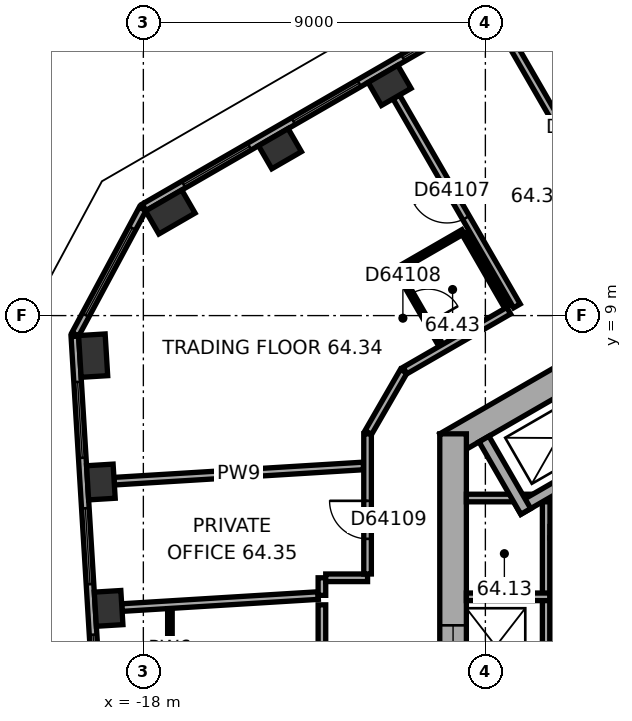
"""IFC4 building model, lengths in metres.
Left out: names, types, materials, properties, quantities, classifications, styles, units other than length and angle.
Written with IfcOpenShell. Run it as: python <this file> out.ifc"""

import sys

from ifc_helpers import new_model, si_unit, direction, frame, frame_2d, origin, origin_2d, place, context, subcontext, project, spatial, rectangle, extrude, element, fill, save


model = new_model("IFC4")
c1 = context("Model", 3, precision=1e-05, world=origin(), true_north=direction((0.0, 1.0)))
c2 = subcontext(c1, "Body", "Model", "MODEL_VIEW")
j1 = project(units=[si_unit("LENGTHUNIT", "METRE"), si_unit("PLANEANGLEUNIT", "RADIAN")], contexts=[c1])
p1 = place(None, origin())
s1 = spatial("IfcSite", under=j1, at=p1, CompositionType="ELEMENT")
p2 = place(p1, origin())
s2 = spatial("IfcBuilding", under=s1, at=p2, CompositionType="ELEMENT")
p3 = place(p2, frame((0.0, 0.0, 259.8)))
s3 = spatial("IfcBuildingStorey", under=s2, at=p3, CompositionType="ELEMENT", Elevation=259.8)
for number, where, z_axis, x_axis in (
    (1, (-11.52, 15.057, 0.0), (0.0, 0.0, 1.0), (-0.866, -0.5, 0.0)),
    (2, (-14.406, 13.391, 0.0), (0.0, 0.0, 1.0), (-0.866, -0.5, 0.0)),
):
    element("IfcColumn", number, at=place(p3, frame(where, z_axis=z_axis, x_axis=x_axis)), inside=s3, PredefinedType="COLUMN", context=c2, shape_type="SweptSolid", body=[
        extrude(rectangle(XDim=0.9, YDim=0.7, at=origin_2d()), origin(), (0.0, 0.0, 1.0), 3.7),
    ])
for number, where, z_axis, x_axis in (
    (3, (-17.291, 11.726, 0.0), (0.0, 0.0, 1.0), (-0.866, -0.5, 0.0)),
    (4, (-19.321, 7.947, 0.0), (0.0, 0.0, 1.0), (0.061, -0.998, 0.0)),
):
    element("IfcColumn", number, at=place(p3, frame(where, z_axis=z_axis, x_axis=x_axis)), inside=s3, PredefinedType="COLUMN", context=c2, shape_type="SweptSolid", body=[
        extrude(rectangle(XDim=1.1, YDim=0.7, at=origin_2d()), origin(), (0.0, 0.0, 1.0), 3.7),
    ])
for number, where, z_axis, x_axis in (
    (5, (-19.118, 4.621, 0.0), (0.0, 0.0, 1.0), (0.061, -0.998, 0.0)),
    (6, (-18.914, 1.296, 0.0), (0.0, 0.0, 1.0), (0.061, -0.998, 0.0)),
):
    element("IfcColumn", number, at=place(p3, frame(where, z_axis=z_axis, x_axis=x_axis)), inside=s3, PredefinedType="COLUMN", context=c2, shape_type="SweptSolid", body=[
        extrude(rectangle(XDim=0.9, YDim=0.7, at=origin_2d()), origin(), (0.0, 0.0, 1.0), 3.7),
    ])
p4 = place(p3, frame((0.175, 11.475, 0.0), z_axis=(0.0, 0.0, 1.0), x_axis=(-0.866026453023, -0.499998182661, 0.0)))
e7 = element("IfcWall", 7, at=p4, inside=s3, PredefinedType="SHEAR", context=c2, shape_type="SweptSolid", body=[
    extrude(rectangle(XDim=11.778, YDim=0.7, at=frame_2d((5.889, 0.0))), origin(), (0.0, 0.0, 1.0), 3.7),
])
p5 = place(p4, frame((6.089, 0.0, 0.0)))
e8 = element("IfcOpeningElement", 8, at=p5, cuts=e7, PredefinedType="OPENING", context=c2, shape_type="SweptSolid", body=[
    extrude(rectangle(XDim=1.5, YDim=2.1, at=frame_2d((0.75, 1.05))), frame((0.0, 0.36, 0.0), z_axis=(0.0, -1.0, 0.0), x_axis=(1.0, 0.0, 0.0)), (0.0, 0.0, 1.0), 0.72),
])
p6 = place(p4, frame((2.939, 0.0, 0.0)))
e9 = element("IfcOpeningElement", 9, at=p6, cuts=e7, PredefinedType="OPENING", context=c2, shape_type="SweptSolid", body=[
    extrude(rectangle(XDim=0.9, YDim=2.1, at=frame_2d((0.45, 1.05))), frame((0.0, 0.36, 0.0), z_axis=(0.0, -1.0, 0.0), x_axis=(1.0, 0.0, 0.0)), (0.0, 0.0, 1.0), 0.72),
])
p7 = place(p3, frame((-9.85, 5.889, 0.0), z_axis=(0.0, 0.0, 1.0), x_axis=(0.0, -1.0, 0.0)))
e10 = element("IfcWall", 10, at=p7, inside=s3, PredefinedType="SHEAR", context=c2, shape_type="SweptSolid", body=[
    extrude(rectangle(XDim=11.778, YDim=0.7, at=frame_2d((5.889, 0.0))), origin(), (0.0, 0.0, 1.0), 3.7),
])
p8 = place(p7, frame((5.039, 0.0, 0.0)))
e11 = element("IfcOpeningElement", 11, at=p8, cuts=e10, PredefinedType="OPENING", context=c2, shape_type="SweptSolid", body=[
    extrude(rectangle(XDim=1.1, YDim=2.1, at=frame_2d((0.55, 1.05))), frame((0.0, 0.36, 0.0), z_axis=(0.0, -1.0, 0.0), x_axis=(1.0, 0.0, 0.0)), (0.0, 0.0, 1.0), 0.72),
])
p9 = place(p7, frame((7.639, 0.0, 0.0)))
e12 = element("IfcOpeningElement", 12, at=p9, cuts=e10, PredefinedType="OPENING", context=c2, shape_type="SweptSolid", body=[
    extrude(rectangle(XDim=1.1, YDim=2.1, at=frame_2d((0.55, 1.05))), frame((0.0, 0.36, 0.0), z_axis=(0.0, -1.0, 0.0), x_axis=(1.0, 0.0, 0.0)), (0.0, 0.0, 1.0), 0.72),
])
p10 = place(p3, frame((-2.624, 20.713, 0.0), z_axis=(0.0, 0.0, 1.0), x_axis=(-0.866026460444, -0.499998169808, 0.0)))
e13 = element("IfcWall", 13, at=p10, inside=s3, PredefinedType="STANDARD", context=c2, shape_type="SweptSolid", body=[
    extrude(rectangle(XDim=17.731, YDim=0.2, at=frame_2d((8.866, 0.0))), origin(), (0.0, 0.0, 1.0), 3.7),
])
p11 = place(p10, frame((1.203, 0.0, 0.9)))
e14 = element("IfcOpeningElement", 14, at=p11, cuts=e13, PredefinedType="OPENING", context=c2, shape_type="SweptSolid", body=[
    extrude(rectangle(XDim=2.0, YDim=2.0, at=frame_2d((1.0, 1.0))), frame((0.0, 0.11, 0.0), z_axis=(0.0, -1.0, 0.0), x_axis=(1.0, 0.0, 0.0)), (0.0, 0.0, 1.0), 0.22),
])
p12 = place(p10, frame((4.535, 0.0, 0.9)))
e15 = element("IfcOpeningElement", 15, at=p12, cuts=e13, PredefinedType="OPENING", context=c2, shape_type="SweptSolid", body=[
    extrude(rectangle(XDim=2.0, YDim=2.0, at=frame_2d((1.0, 1.0))), frame((0.0, 0.11, 0.0), z_axis=(0.0, -1.0, 0.0), x_axis=(1.0, 0.0, 0.0)), (0.0, 0.0, 1.0), 0.22),
])
p13 = place(p10, frame((7.867, 0.0, 0.9)))
e16 = element("IfcOpeningElement", 16, at=p13, cuts=e13, PredefinedType="OPENING", context=c2, shape_type="SweptSolid", body=[
    extrude(rectangle(XDim=2.0, YDim=2.0, at=frame_2d((1.0, 1.0))), frame((0.0, 0.11, 0.0), z_axis=(0.0, -1.0, 0.0), x_axis=(1.0, 0.0, 0.0)), (0.0, 0.0, 1.0), 0.22),
])
p14 = place(p10, frame((11.198, 0.0, 0.9)))
e17 = element("IfcOpeningElement", 17, at=p14, cuts=e13, PredefinedType="OPENING", context=c2, shape_type="SweptSolid", body=[
    extrude(rectangle(XDim=2.0, YDim=2.0, at=frame_2d((1.0, 1.0))), frame((0.0, 0.11, 0.0), z_axis=(0.0, -1.0, 0.0), x_axis=(1.0, 0.0, 0.0)), (0.0, 0.0, 1.0), 0.22),
])
p15 = place(p10, frame((14.53, 0.0, 0.9)))
e18 = element("IfcOpeningElement", 18, at=p15, cuts=e13, PredefinedType="OPENING", context=c2, shape_type="SweptSolid", body=[
    extrude(rectangle(XDim=2.0, YDim=2.0, at=frame_2d((1.0, 1.0))), frame((0.0, 0.11, 0.0), z_axis=(0.0, -1.0, 0.0), x_axis=(1.0, 0.0, 0.0)), (0.0, 0.0, 1.0), 0.22),
])
p16 = place(p3, frame((-18.018, 11.808, 0.0), z_axis=(0.0, 0.0, 1.0), x_axis=(-0.473318619185, -0.880891301315, 0.0)))
e19 = element("IfcWall", 19, at=p16, inside=s3, PredefinedType="STANDARD", context=c2, shape_type="SweptSolid", body=[
    extrude(rectangle(XDim=3.747, YDim=0.2, at=frame_2d((1.874, 0.0))), origin(), (0.0, 0.0, 1.0), 3.7),
])
p17 = place(p16, frame((0.573, 0.0, 0.9)))
e20 = element("IfcOpeningElement", 20, at=p17, cuts=e19, PredefinedType="OPENING", context=c2, shape_type="SweptSolid", body=[
    extrude(rectangle(XDim=2.6, YDim=2.0, at=frame_2d((1.3, 1.0))), frame((0.0, 0.11, 0.0), z_axis=(0.0, -1.0, 0.0), x_axis=(1.0, 0.0, 0.0)), (0.0, 0.0, 1.0), 0.22),
])
p18 = place(p3, frame((-19.803, 8.454, 0.0), z_axis=(0.0, 0.0, 1.0), x_axis=(0.061036717565, -0.998135521414, 0.0)))
e21 = element("IfcWall", 21, at=p18, inside=s3, PredefinedType="STANDARD", context=c2, shape_type="SweptSolid", body=[
    extrude(rectangle(XDim=17.731, YDim=0.2, at=frame_2d((8.866, 0.0))), origin(), (0.0, 0.0, 1.0), 3.7),
])
p19 = place(p18, frame((1.202, 0.0, 0.9)))
e22 = element("IfcOpeningElement", 22, at=p19, cuts=e21, PredefinedType="OPENING", context=c2, shape_type="SweptSolid", body=[
    extrude(rectangle(XDim=2.0, YDim=2.0, at=frame_2d((1.0, 1.0))), frame((0.0, 0.11, 0.0), z_axis=(0.0, -1.0, 0.0), x_axis=(1.0, 0.0, 0.0)), (0.0, 0.0, 1.0), 0.22),
])
p20 = place(p18, frame((4.533, 0.0, 0.9)))
e23 = element("IfcOpeningElement", 23, at=p20, cuts=e21, PredefinedType="OPENING", context=c2, shape_type="SweptSolid", body=[
    extrude(rectangle(XDim=2.0, YDim=2.0, at=frame_2d((1.0, 1.0))), frame((0.0, 0.11, 0.0), z_axis=(0.0, -1.0, 0.0), x_axis=(1.0, 0.0, 0.0)), (0.0, 0.0, 1.0), 0.22),
])
p21 = place(p18, frame((7.865, 0.0, 0.9)))
e24 = element("IfcOpeningElement", 24, at=p21, cuts=e21, PredefinedType="OPENING", context=c2, shape_type="SweptSolid", body=[
    extrude(rectangle(XDim=2.0, YDim=2.0, at=frame_2d((1.0, 1.0))), frame((0.0, 0.11, 0.0), z_axis=(0.0, -1.0, 0.0), x_axis=(1.0, 0.0, 0.0)), (0.0, 0.0, 1.0), 0.22),
])
p22 = place(p18, frame((11.197, 0.0, 0.9)))
e25 = element("IfcOpeningElement", 25, at=p22, cuts=e21, PredefinedType="OPENING", context=c2, shape_type="SweptSolid", body=[
    extrude(rectangle(XDim=2.0, YDim=2.0, at=frame_2d((1.0, 1.0))), frame((0.0, 0.11, 0.0), z_axis=(0.0, -1.0, 0.0), x_axis=(1.0, 0.0, 0.0)), (0.0, 0.0, 1.0), 0.22),
])
p23 = place(p18, frame((14.528, 0.0, 0.9)))
e26 = element("IfcOpeningElement", 26, at=p23, cuts=e21, PredefinedType="OPENING", context=c2, shape_type="SweptSolid", body=[
    extrude(rectangle(XDim=2.0, YDim=2.0, at=frame_2d((1.0, 1.0))), frame((0.0, 0.11, 0.0), z_axis=(0.0, -1.0, 0.0), x_axis=(1.0, 0.0, 0.0)), (0.0, 0.0, 1.0), 0.22),
])
p24 = place(p3, frame((-7.4, 4.3, 0.0), z_axis=(0.0, 0.0, 1.0), x_axis=(0.0, -1.0, 0.0)))
e27 = element("IfcWall", 27, at=p24, inside=s3, PredefinedType="PARTITIONING", context=c2, shape_type="SweptSolid", body=[
    extrude(rectangle(XDim=8.0, YDim=0.2, at=frame_2d((4.0, 0.0))), origin(), (0.0, 0.0, 1.0), 3.42),
])
for number, where, z_axis, x_axis in (
    (28, (-7.3, 4.2, 0.0), (0.0, 0.0, 1.0), (-1.0, 0.0, 0.0)),
    (29, (-7.3, 1.6, 0.0), (0.0, 0.0, 1.0), (-1.0, 0.0, 0.0)),
):
    element("IfcWall", number, at=place(p3, frame(where, z_axis=z_axis, x_axis=x_axis)), inside=s3, PredefinedType="PARTITIONING", context=c2, shape_type="SweptSolid", body=[
        extrude(rectangle(XDim=2.2, YDim=0.2, at=frame_2d((1.1, 0.0))), origin(), (0.0, 0.0, 1.0), 3.42),
    ])
p25 = place(p3, frame((-2.6, 3.3, 0.0), z_axis=(0.0, 0.0, 1.0), x_axis=(-1.0, 0.0, 0.0)))
e30 = element("IfcWall", 30, at=p25, inside=s3, PredefinedType="SHEAR", context=c2, shape_type="SweptSolid", body=[
    extrude(rectangle(XDim=4.7, YDim=0.3, at=frame_2d((2.35, 0.0))), origin(), (0.0, 0.0, 1.0), 3.42),
])
p26 = place(p25, frame((0.8, 0.0, 0.0)))
e31 = element("IfcOpeningElement", 31, at=p26, cuts=e30, PredefinedType="OPENING", context=c2, shape_type="SweptSolid", body=[
    extrude(rectangle(XDim=1.2, YDim=2.1, at=frame_2d((0.6, 1.05))), frame((0.0, 0.16, 0.0), z_axis=(0.0, -1.0, 0.0), x_axis=(1.0, 0.0, 0.0)), (0.0, 0.0, 1.0), 0.32),
])
p27 = place(p3, frame((-7.15, 3.15, 0.0), z_axis=(0.0, 0.0, 1.0), x_axis=(0.0, -1.0, 0.0)))
e32 = element("IfcWall", 32, at=p27, inside=s3, PredefinedType="SHEAR", context=c2, shape_type="SweptSolid", body=[
    extrude(rectangle(XDim=7.06, YDim=0.3, at=frame_2d((3.53, 0.0))), origin(), (0.0, 0.0, 1.0), 3.42),
])
p28 = place(p3, frame((-5.24, 5.577, 0.0), z_axis=(0.0, 0.0, 1.0), x_axis=(-0.866014461049, -0.500018952895, 0.0)))
e33 = element("IfcWall", 33, at=p28, inside=s3, PredefinedType="SHEAR", context=c2, shape_type="SweptSolid", body=[
    extrude(rectangle(XDim=3.35, YDim=0.3, at=frame_2d((1.675, 0.0))), origin(), (0.0, 0.0, 1.0), 3.42),
])
p29 = place(p3, frame((-7.937, 3.847, 0.0), z_axis=(0.0, 0.0, 1.0), x_axis=(-0.50002983664, 0.866008176907, 0.0)))
e34 = element("IfcWall", 34, at=p29, inside=s3, PredefinedType="SHEAR", context=c2, shape_type="SweptSolid", body=[
    extrude(rectangle(XDim=2.2, YDim=0.3, at=frame_2d((1.1, 0.0))), origin(), (0.0, 0.0, 1.0), 3.42),
])
p30 = place(p3, frame((-18.768, 4.643, 0.0), z_axis=(0.0, 0.0, 1.0), x_axis=(0.99813496285, 0.0610458511, 0.0)))
e35 = element("IfcWall", 35, at=p30, inside=s3, PredefinedType="PARTITIONING", context=c2, shape_type="SweptSolid", body=[
    extrude(rectangle(XDim=6.571, YDim=0.2, at=frame_2d((3.285, 0.0))), origin(), (0.0, 0.0, 1.0), 3.42),
])
p31 = place(p3, frame((-18.565, 1.317, 0.0), z_axis=(0.0, 0.0, 1.0), x_axis=(0.998136844425, 0.061015078472, 0.0)))
e36 = element("IfcWall", 36, at=p31, inside=s3, PredefinedType="PARTITIONING", context=c2, shape_type="SweptSolid", body=[
    extrude(rectangle(XDim=5.174, YDim=0.2, at=frame_2d((2.587, 0.0))), origin(), (0.0, 0.0, 1.0), 2.87),
])
p32 = place(p3, frame((-17.301, -3.011, 0.0), z_axis=(0.0, 0.0, 1.0), x_axis=(0.0, 1.0, 0.0)))
e37 = element("IfcWall", 37, at=p32, inside=s3, PredefinedType="PARTITIONING", context=c2, shape_type="SweptSolid", body=[
    extrude(rectangle(XDim=4.3, YDim=0.12, at=frame_2d((2.15, 0.0))), origin(), (0.0, 0.0, 1.0), 3.42),
])
p33 = place(p32, frame((1.7, 0.0, 0.0)))
e38 = element("IfcOpeningElement", 38, at=p33, cuts=e37, PredefinedType="OPENING", context=c2, shape_type="SweptSolid", body=[
    extrude(rectangle(XDim=0.9, YDim=2.1, at=frame_2d((0.45, 1.05))), frame((0.0, 0.07, 0.0), z_axis=(0.0, -1.0, 0.0), x_axis=(1.0, 0.0, 0.0)), (0.0, 0.0, 1.0), 0.14),
])
p34 = place(p3, frame((-13.301, 1.389, 0.0), z_axis=(0.0, 0.0, 1.0), x_axis=(0.0, -1.0, 0.0)))
e39 = element("IfcWall", 39, at=p34, inside=s3, PredefinedType="PARTITIONING", context=c2, shape_type="SweptSolid", body=[
    extrude(rectangle(XDim=5.39, YDim=0.2, at=frame_2d((2.695, 0.0))), origin(), (0.0, 0.0, 1.0), 3.42),
])
p35 = place(p3, frame((-13.301, 2.101, 0.0), z_axis=(0.0, 0.0, 1.0), x_axis=(0.0, -1.0, 0.0)))
e40 = element("IfcWall", 40, at=p35, inside=s3, PredefinedType="PARTITIONING", context=c2, shape_type="SweptSolid", body=[
    extrude(rectangle(XDim=0.462, YDim=0.2, at=frame_2d((0.231, 0.0))), origin(), (0.0, 0.0, 1.0), 3.42),
])
p36 = place(p3, frame((-12.1, 2.101, 0.0), z_axis=(0.0, 0.0, 1.0), x_axis=(-1.0, 0.0, 0.0)))
e41 = element("IfcWall", 41, at=p36, inside=s3, PredefinedType="PARTITIONING", context=c2, shape_type="SweptSolid", body=[
    extrude(rectangle(XDim=1.101, YDim=0.2, at=frame_2d((0.55, 0.0))), origin(), (0.0, 0.0, 1.0), 3.42),
])
p37 = place(p3, frame((-12.1, 5.889, 0.0), z_axis=(0.0, 0.0, 1.0), x_axis=(0.0, -1.0, 0.0)))
e42 = element("IfcWall", 42, at=p37, inside=s3, PredefinedType="PARTITIONING", context=c2, shape_type="SweptSolid", body=[
    extrude(rectangle(XDim=3.688, YDim=0.2, at=frame_2d((1.844, 0.0))), origin(), (0.0, 0.0, 1.0), 3.42),
])
p38 = place(p37, frame((1.763, 0.0, 0.0)))
e43 = element("IfcOpeningElement", 43, at=p38, cuts=e42, PredefinedType="OPENING", context=c2, shape_type="SweptSolid", body=[
    extrude(rectangle(XDim=1.0, YDim=2.1, at=frame_2d((0.5, 1.05))), frame((0.0, 0.11, 0.0), z_axis=(0.0, -1.0, 0.0), x_axis=(1.0, 0.0, 0.0)), (0.0, 0.0, 1.0), 0.22),
])
p39 = place(p3, frame((-11.345, 14.754, 0.0), z_axis=(0.0, 0.0, 1.0), x_axis=(0.500005339912, -0.866022320763, 0.0)))
e44 = element("IfcWall", 44, at=p39, inside=s3, PredefinedType="PARTITIONING", context=c2, shape_type="SweptSolid", body=[
    extrude(rectangle(XDim=6.35, YDim=0.2, at=frame_2d((3.175, 0.0))), origin(), (0.0, 0.0, 1.0), 3.42),
])
p40 = place(p39, frame((2.675, 0.0, 0.0)))
e45 = element("IfcOpeningElement", 45, at=p40, cuts=e44, PredefinedType="OPENING", context=c2, shape_type="SweptSolid", body=[
    extrude(rectangle(XDim=1.0, YDim=2.1, at=frame_2d((0.5, 1.05))), frame((0.0, 0.11, 0.0), z_axis=(0.0, -1.0, 0.0), x_axis=(1.0, 0.0, 0.0)), (0.0, 0.0, 1.0), 0.22),
])
p41 = place(p3, frame((-11.319, 10.208, 0.0), z_axis=(0.0, 0.0, 1.0), x_axis=(0.866010750942, 0.50002537861, 0.0)))
e46 = element("IfcWall", 46, at=p41, inside=s3, PredefinedType="PARTITIONING", context=c2, shape_type="SweptSolid", body=[
    extrude(rectangle(XDim=2.0, YDim=0.12, at=frame_2d((1.0, 0.0))), origin(), (0.0, 0.0, 1.0), 3.42),
])
p42 = place(p3, frame((-11.15, 7.534, 0.0), z_axis=(0.0, 0.0, 1.0), x_axis=(-0.500063286585, -0.865988862174, 0.0)))
e47 = element("IfcWall", 47, at=p42, inside=s3, PredefinedType="PARTITIONING", context=c2, shape_type="SweptSolid", body=[
    extrude(rectangle(XDim=1.86, YDim=0.2, at=frame_2d((0.93, 0.0))), origin(), (0.0, 0.0, 1.0), 3.42),
])
p43 = place(p3, frame((-10.169, 8.216, 0.0), z_axis=(0.0, 0.0, 1.0), x_axis=(-0.500030632641, 0.866007717299, 0.0)))
e48 = element("IfcWall", 48, at=p43, inside=s3, PredefinedType="PARTITIONING", context=c2, shape_type="SweptSolid", body=[
    extrude(rectangle(XDim=2.24, YDim=0.12, at=frame_2d((1.12, 0.0))), origin(), (0.0, 0.0, 1.0), 3.42),
])
p44 = place(p43, frame((0.67, 0.0, 0.0)))
e49 = element("IfcOpeningElement", 49, at=p44, cuts=e48, PredefinedType="OPENING", context=c2, shape_type="SweptSolid", body=[
    extrude(rectangle(XDim=0.9, YDim=2.1, at=frame_2d((0.45, 1.05))), frame((0.0, 0.07, 0.0), z_axis=(0.0, -1.0, 0.0), x_axis=(1.0, 0.0, 0.0)), (0.0, 0.0, 1.0), 0.14),
])
p45 = place(p3, frame((-9.557, 11.156, 0.0), z_axis=(0.0, 0.0, 1.0), x_axis=(0.49994888933, -0.866054910533, 0.0)))
e50 = element("IfcWall", 50, at=p45, inside=s3, PredefinedType="PARTITIONING", context=c2, shape_type="SweptSolid", body=[
    extrude(rectangle(XDim=2.24, YDim=0.12, at=frame_2d((1.12, 0.0))), origin(), (0.0, 0.0, 1.0), 3.42),
])
p46 = place(p3, frame((-8.46, 16.42, 0.0), z_axis=(0.0, 0.0, 1.0), x_axis=(0.500005339912, -0.866022320763, 0.0)))
e51 = element("IfcWall", 51, at=p46, inside=s3, PredefinedType="PARTITIONING", context=c2, shape_type="SweptSolid", body=[
    extrude(rectangle(XDim=6.35, YDim=0.2, at=frame_2d((3.175, 0.0))), origin(), (0.0, 0.0, 1.0), 2.87),
])
p47 = place(p46, frame((2.675, 0.0, 0.0)))
e52 = element("IfcOpeningElement", 52, at=p47, cuts=e51, PredefinedType="OPENING", context=c2, shape_type="SweptSolid", body=[
    extrude(rectangle(XDim=1.0, YDim=2.1, at=frame_2d((0.5, 1.05))), frame((0.0, 0.11, 0.0), z_axis=(0.0, -1.0, 0.0), x_axis=(1.0, 0.0, 0.0)), (0.0, 0.0, 1.0), 0.22),
])
p48 = place(p3, frame((-8.387, 9.13, 0.0), z_axis=(0.0, 0.0, 1.0), x_axis=(-0.866026878644, -0.499997445459, 0.0)))
e53 = element("IfcWall", 53, at=p48, inside=s3, PredefinedType="PARTITIONING", context=c2, shape_type="SweptSolid", body=[
    extrude(rectangle(XDim=3.151, YDim=0.2, at=frame_2d((1.575, 0.0))), origin(), (0.0, 0.0, 1.0), 3.42),
])
p49 = place(p13, origin())
e54 = element("IfcWindow", 54, at=p49, inside=s3, PartitioningType="SINGLE_PANEL", PredefinedType="WINDOW", context=c2, shape_type="SweptSolid", body=[
    extrude(rectangle(XDim=2.0, YDim=2.0, at=frame_2d((1.0, 1.0))), frame((0.0, 0.03, 0.0), z_axis=(0.0, -1.0, 0.0), x_axis=(1.0, 0.0, 0.0)), (0.0, 0.0, 1.0), 0.06),
])
fill(e16, e54)
p50 = place(p14, origin())
e55 = element("IfcWindow", 55, at=p50, inside=s3, PartitioningType="SINGLE_PANEL", PredefinedType="WINDOW", context=c2, shape_type="SweptSolid", body=[
    extrude(rectangle(XDim=2.0, YDim=2.0, at=frame_2d((1.0, 1.0))), frame((0.0, 0.03, 0.0), z_axis=(0.0, -1.0, 0.0), x_axis=(1.0, 0.0, 0.0)), (0.0, 0.0, 1.0), 0.06),
])
fill(e17, e55)
p51 = place(p15, origin())
e56 = element("IfcWindow", 56, at=p51, inside=s3, PartitioningType="SINGLE_PANEL", PredefinedType="WINDOW", context=c2, shape_type="SweptSolid", body=[
    extrude(rectangle(XDim=2.0, YDim=2.0, at=frame_2d((1.0, 1.0))), frame((0.0, 0.03, 0.0), z_axis=(0.0, -1.0, 0.0), x_axis=(1.0, 0.0, 0.0)), (0.0, 0.0, 1.0), 0.06),
])
fill(e18, e56)
p52 = place(p17, origin())
e57 = element("IfcWindow", 57, at=p52, inside=s3, PartitioningType="SINGLE_PANEL", PredefinedType="WINDOW", context=c2, shape_type="SweptSolid", body=[
    extrude(rectangle(XDim=2.6, YDim=2.0, at=frame_2d((1.3, 1.0))), frame((0.0, 0.03, 0.0), z_axis=(0.0, -1.0, 0.0), x_axis=(1.0, 0.0, 0.0)), (0.0, 0.0, 1.0), 0.06),
])
fill(e20, e57)
p53 = place(p19, origin())
e58 = element("IfcWindow", 58, at=p53, inside=s3, PartitioningType="SINGLE_PANEL", PredefinedType="WINDOW", context=c2, shape_type="SweptSolid", body=[
    extrude(rectangle(XDim=2.0, YDim=2.0, at=frame_2d((1.0, 1.0))), frame((0.0, 0.03, 0.0), z_axis=(0.0, -1.0, 0.0), x_axis=(1.0, 0.0, 0.0)), (0.0, 0.0, 1.0), 0.06),
])
fill(e22, e58)
p54 = place(p20, origin())
e59 = element("IfcWindow", 59, at=p54, inside=s3, PartitioningType="SINGLE_PANEL", PredefinedType="WINDOW", context=c2, shape_type="SweptSolid", body=[
    extrude(rectangle(XDim=2.0, YDim=2.0, at=frame_2d((1.0, 1.0))), frame((0.0, 0.03, 0.0), z_axis=(0.0, -1.0, 0.0), x_axis=(1.0, 0.0, 0.0)), (0.0, 0.0, 1.0), 0.06),
])
fill(e23, e59)
p55 = place(p21, origin())
e60 = element("IfcWindow", 60, at=p55, inside=s3, PartitioningType="SINGLE_PANEL", PredefinedType="WINDOW", context=c2, shape_type="SweptSolid", body=[
    extrude(rectangle(XDim=2.0, YDim=2.0, at=frame_2d((1.0, 1.0))), frame((0.0, 0.03, 0.0), z_axis=(0.0, -1.0, 0.0), x_axis=(1.0, 0.0, 0.0)), (0.0, 0.0, 1.0), 0.06),
])
fill(e24, e60)
p56 = place(p8, origin())
e61 = element("IfcDoor", 61, at=p56, inside=s3, OperationType="DOUBLE_DOOR_SLIDING", PredefinedType="DOOR", context=c2, shape_type="SweptSolid", body=[
    extrude(rectangle(XDim=1.1, YDim=2.1, at=frame_2d((0.55, 1.05))), frame((0.0, 0.025, 0.0), z_axis=(0.0, -1.0, 0.0), x_axis=(1.0, 0.0, 0.0)), (0.0, 0.0, 1.0), 0.05),
])
fill(e11, e61)
p57 = place(p40, origin())
e62 = element("IfcDoor", 62, at=p57, inside=s3, OperationType="SINGLE_SWING_LEFT", PredefinedType="DOOR", context=c2, shape_type="SweptSolid", body=[
    extrude(rectangle(XDim=1.0, YDim=2.1, at=frame_2d((0.5, 1.05))), frame((0.0, 0.025, 0.0), z_axis=(0.0, -1.0, 0.0), x_axis=(1.0, 0.0, 0.0)), (0.0, 0.0, 1.0), 0.05),
])
fill(e45, e62)
p58 = place(p44, origin())
e63 = element("IfcDoor", 63, at=p58, inside=s3, OperationType="SINGLE_SWING_LEFT", PredefinedType="DOOR", context=c2, shape_type="SweptSolid", body=[
    extrude(rectangle(XDim=0.9, YDim=2.1, at=frame_2d((0.45, 1.05))), frame((0.0, 0.025, 0.0), z_axis=(0.0, -1.0, 0.0), x_axis=(1.0, 0.0, 0.0)), (0.0, 0.0, 1.0), 0.05),
])
fill(e49, e63)
p59 = place(p38, origin())
e64 = element("IfcDoor", 64, at=p59, inside=s3, OperationType="SINGLE_SWING_LEFT", PredefinedType="DOOR", context=c2, shape_type="SweptSolid", body=[
    extrude(rectangle(XDim=1.0, YDim=2.1, at=frame_2d((0.5, 1.05))), frame((0.0, 0.025, 0.0), z_axis=(0.0, -1.0, 0.0), x_axis=(1.0, 0.0, 0.0)), (0.0, 0.0, 1.0), 0.05),
])
fill(e43, e64)
save(model, sys.argv[1])
